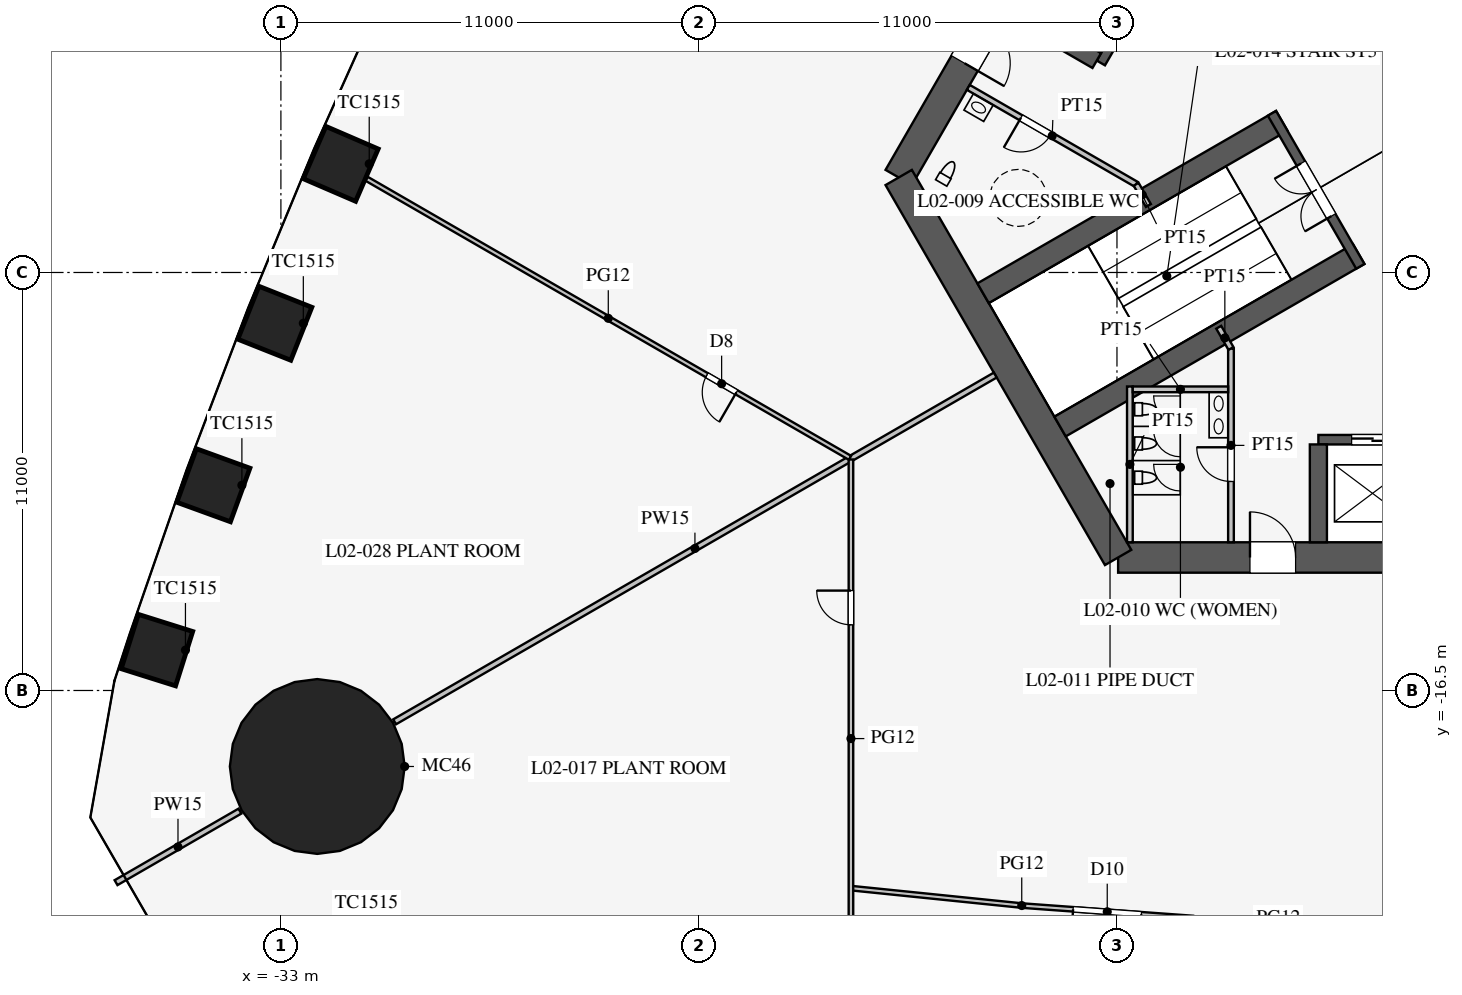
"""IFC4 building model, lengths in metres.
Left out: names, types, materials, properties, quantities, classifications, styles, units other than length and angle.
Written with IfcOpenShell. Run it as: python <this file> out.ifc"""

import sys

from ifc_helpers import new_model, si_unit, direction, frame, frame_2d, origin, origin_2d, place, context, subcontext, project, spatial, rectangle, circle, extrude, element, fill, save


model = new_model("IFC4")
c1 = context("Model", 3, precision=1e-05, world=origin(), true_north=direction((0.0, 1.0)))
c2 = subcontext(c1, "Body", "Model", "MODEL_VIEW")
j1 = project(units=[si_unit("LENGTHUNIT", "METRE"), si_unit("PLANEANGLEUNIT", "RADIAN")], contexts=[c1])
p1 = place(None, origin())
s1 = spatial("IfcSite", under=j1, at=p1, CompositionType="ELEMENT")
p2 = place(p1, origin())
s2 = spatial("IfcBuilding", under=s1, at=p2, CompositionType="ELEMENT")
p3 = place(p2, frame((0.0, 0.0, 11.5)))
s3 = spatial("IfcBuildingStorey", under=s2, at=p3, CompositionType="ELEMENT", Elevation=11.5)
for number, where, z_axis, x_axis in (
    (1, (-31.426, -2.641, 0.0), (0.0, 0.0, 1.0), (-0.396, -0.918, 0.0)),
    (2, (-33.16, -6.836, 0.0), (0.0, 0.0, 1.0), (-0.369, -0.929, 0.0)),
    (3, (-34.776, -11.099, 0.0), (0.0, 0.0, 1.0), (-0.342, -0.94, 0.0)),
    (4, (-36.262, -15.438, 0.0), (0.0, 0.0, 1.0), (-0.3, -0.954, 0.0)),
):
    element("IfcColumn", number, at=place(p3, frame(where, z_axis=z_axis, x_axis=x_axis)), inside=s3, PredefinedType="COLUMN", context=c2, shape_type="SweptSolid", body=[
        extrude(rectangle(XDim=1.5, YDim=1.5, at=origin_2d()), origin(), (0.0, 0.0, 1.0), 5.0),
    ])
p4 = place(p3, frame((-32.043, -18.5, 0.0), z_axis=(0.0, 0.0, 1.0), x_axis=(1.0, 0.0, 0.0)))
e5 = element("IfcColumn", 5, at=p4, inside=s3, PredefinedType="COLUMN", context=c2, shape_type="SweptSolid", body=[
    extrude(circle(Radius=2.3, at=origin_2d()), origin(), (0.0, 0.0, 1.0), 5.0),
])
p5 = place(p3, frame((-10.97, -13.0, 0.0), z_axis=(0.0, 0.0, 1.0), x_axis=(1.0, 0.0, 0.0)))
e6 = element("IfcWall", 6, at=p5, inside=s3, PredefinedType="SHEAR", context=c2, shape_type="SweptSolid", body=[
    extrude(rectangle(XDim=21.939, YDim=0.8, at=frame_2d((10.97, 0.0))), origin(), (0.0, 0.0, 1.0), 5.0),
])
p6 = place(p5, frame((17.27, 0.0, 0.0)))
e7 = element("IfcOpeningElement", 7, at=p6, cuts=e6, PredefinedType="OPENING", context=c2, shape_type="SweptSolid", body=[
    extrude(rectangle(XDim=1.2, YDim=2.1, at=frame_2d((0.6, 1.05))), frame((0.0, 0.41, 0.0), z_axis=(0.0, -1.0, 0.0), x_axis=(1.0, 0.0, 0.0)), (0.0, 0.0, 1.0), 0.82),
])
p7 = place(p5, frame((3.47, 0.0, 0.0)))
e8 = element("IfcOpeningElement", 8, at=p7, cuts=e6, PredefinedType="OPENING", context=c2, shape_type="SweptSolid", body=[
    extrude(rectangle(XDim=1.2, YDim=2.1, at=frame_2d((0.6, 1.05))), frame((0.0, 0.41, 0.0), z_axis=(0.0, -1.0, 0.0), x_axis=(1.0, 0.0, 0.0)), (0.0, 0.0, 1.0), 0.82),
])
p8 = place(p3, frame((-5.773, 16.0, 0.0), z_axis=(0.0, 0.0, 1.0), x_axis=(-0.500002442456, -0.866023993627, 0.0)))
e9 = element("IfcWall", 9, at=p8, inside=s3, PredefinedType="SHEAR", context=c2, shape_type="SweptSolid", body=[
    extrude(rectangle(XDim=21.939, YDim=0.8, at=frame_2d((10.97, 0.0))), origin(), (0.0, 0.0, 1.0), 5.0),
])
p9 = place(p8, frame((17.27, 0.0, 0.0)))
e10 = element("IfcOpeningElement", 10, at=p9, cuts=e9, PredefinedType="OPENING", context=c2, shape_type="SweptSolid", body=[
    extrude(rectangle(XDim=1.2, YDim=2.1, at=frame_2d((0.6, 1.05))), frame((0.0, 0.41, 0.0), z_axis=(0.0, -1.0, 0.0), x_axis=(1.0, 0.0, 0.0)), (0.0, 0.0, 1.0), 0.82),
])
p10 = place(p8, frame((3.47, 0.0, 0.0)))
e11 = element("IfcOpeningElement", 11, at=p10, cuts=e9, PredefinedType="OPENING", context=c2, shape_type="SweptSolid", body=[
    extrude(rectangle(XDim=1.2, YDim=2.1, at=frame_2d((0.6, 1.05))), frame((0.0, 0.41, 0.0), z_axis=(0.0, -1.0, 0.0), x_axis=(1.0, 0.0, 0.0)), (0.0, 0.0, 1.0), 0.82),
])
p11 = place(p3, frame((-16.743, -3.0, 0.0), z_axis=(0.0, 0.0, 1.0), x_axis=(0.499995765644, -0.866027848477, 0.0)))
e12 = element("IfcWall", 12, at=p11, inside=s3, PredefinedType="SHEAR", context=c2, shape_type="SweptSolid", body=[
    extrude(rectangle(XDim=11.547, YDim=0.8, at=frame_2d((5.773, 0.0))), origin(), (0.0, 0.0, 1.0), 5.0),
])
p12 = place(p3, frame((-5.7, -9.9, 0.0), z_axis=(0.0, 0.0, 1.0), x_axis=(1.0, 0.0, 0.0)))
e13 = element("IfcWall", 13, at=p12, inside=s3, PredefinedType="SHEAR", context=c2, shape_type="SweptSolid", body=[
    extrude(rectangle(XDim=11.4, YDim=0.25, at=frame_2d((5.7, 0.0))), origin(), (0.0, 0.0, 1.0), 5.0),
])
p13 = place(p12, frame((0.875, 0.0, 0.0)))
e14 = element("IfcOpeningElement", 14, at=p13, cuts=e13, PredefinedType="OPENING", context=c2, shape_type="SweptSolid", body=[
    extrude(rectangle(XDim=1.1, YDim=2.2, at=frame_2d((0.55, 1.1))), frame((0.0, 0.135, 0.0), z_axis=(0.0, -1.0, 0.0), x_axis=(1.0, 0.0, 0.0)), (0.0, 0.0, 1.0), 0.27),
])
p14 = place(p12, frame((3.725, 0.0, 0.0)))
e15 = element("IfcOpeningElement", 15, at=p14, cuts=e13, PredefinedType="OPENING", context=c2, shape_type="SweptSolid", body=[
    extrude(rectangle(XDim=1.1, YDim=2.2, at=frame_2d((0.55, 1.1))), frame((0.0, 0.135, 0.0), z_axis=(0.0, -1.0, 0.0), x_axis=(1.0, 0.0, 0.0)), (0.0, 0.0, 1.0), 0.27),
])
p15 = place(p12, frame((6.575, 0.0, 0.0)))
e16 = element("IfcOpeningElement", 16, at=p15, cuts=e13, PredefinedType="OPENING", context=c2, shape_type="SweptSolid", body=[
    extrude(rectangle(XDim=1.1, YDim=2.2, at=frame_2d((0.55, 1.1))), frame((0.0, 0.135, 0.0), z_axis=(0.0, -1.0, 0.0), x_axis=(1.0, 0.0, 0.0)), (0.0, 0.0, 1.0), 0.27),
])
p16 = place(p12, frame((9.425, 0.0, 0.0)))
e17 = element("IfcOpeningElement", 17, at=p16, cuts=e13, PredefinedType="OPENING", context=c2, shape_type="SweptSolid", body=[
    extrude(rectangle(XDim=1.1, YDim=2.2, at=frame_2d((0.55, 1.1))), frame((0.0, 0.135, 0.0), z_axis=(0.0, -1.0, 0.0), x_axis=(1.0, 0.0, 0.0)), (0.0, 0.0, 1.0), 0.27),
])
p17 = place(p3, frame((-5.7, -10.025, 0.0), z_axis=(0.0, 0.0, 1.0), x_axis=(0.0, -1.0, 0.0)))
e18 = element("IfcWall", 18, at=p17, inside=s3, PredefinedType="SHEAR", context=c2, shape_type="SweptSolid", body=[
    extrude(rectangle(XDim=2.575, YDim=0.45, at=frame_2d((1.288, 0.0))), origin(), (0.0, 0.0, 1.0), 5.0),
])
p18 = place(p3, frame((-5.724, 9.886, 0.0), z_axis=(0.0, 0.0, 1.0), x_axis=(-0.500001763848, -0.866024385424, 0.0)))
e19 = element("IfcWall", 19, at=p18, inside=s3, PredefinedType="SHEAR", context=c2, shape_type="SweptSolid", body=[
    extrude(rectangle(XDim=11.4, YDim=0.25, at=frame_2d((5.7, 0.0))), origin(), (0.0, 0.0, 1.0), 5.0),
])
p19 = place(p18, frame((6.525, 0.0, 0.0)))
e20 = element("IfcOpeningElement", 20, at=p19, cuts=e19, PredefinedType="OPENING", context=c2, shape_type="SweptSolid", body=[
    extrude(rectangle(XDim=1.2, YDim=2.2, at=frame_2d((0.6, 1.1))), frame((0.0, 0.135, 0.0), z_axis=(0.0, -1.0, 0.0), x_axis=(1.0, 0.0, 0.0)), (0.0, 0.0, 1.0), 0.27),
])
p20 = place(p18, frame((9.375, 0.0, 0.0)))
e21 = element("IfcOpeningElement", 21, at=p20, cuts=e19, PredefinedType="OPENING", context=c2, shape_type="SweptSolid", body=[
    extrude(rectangle(XDim=1.2, YDim=2.2, at=frame_2d((0.6, 1.1))), frame((0.0, 0.135, 0.0), z_axis=(0.0, -1.0, 0.0), x_axis=(1.0, 0.0, 0.0)), (0.0, 0.0, 1.0), 0.27),
])
p21 = place(p3, frame((-11.532, 0.076, 0.0), z_axis=(0.0, 0.0, 1.0), x_axis=(-0.866005588531, 0.500034319456, 0.0)))
e22 = element("IfcWall", 22, at=p21, inside=s3, PredefinedType="SHEAR", context=c2, shape_type="SweptSolid", body=[
    extrude(rectangle(XDim=2.575, YDim=0.45, at=frame_2d((1.288, 0.0))), origin(), (0.0, 0.0, 1.0), 5.0),
])
for number, where, z_axis, x_axis in (
    (23, (-6.663, -1.509, 0.0), (0.0, 0.0, 1.0), (-0.866, -0.5, 0.0)),
    (24, (-4.638, -5.016, 0.0), (0.0, 0.0, 1.0), (-0.866, -0.5, 0.0)),
):
    element("IfcWall", number, at=place(p3, frame(where, z_axis=z_axis, x_axis=x_axis)), inside=s3, PredefinedType="SHEAR", context=c2, shape_type="SweptSolid", body=[
        extrude(rectangle(XDim=9.075, YDim=0.6, at=frame_2d((4.538, 0.0))), origin(), (0.0, 0.0, 1.0), 5.0),
    ])
p22 = place(p3, frame((-6.922, -1.312, 0.0), z_axis=(0.0, 0.0, 1.0), x_axis=(0.499984536904, -0.866034331223, 0.0)))
e25 = element("IfcWall", 25, at=p22, inside=s3, PredefinedType="SHEAR", context=c2, shape_type="SweptSolid", body=[
    extrude(rectangle(XDim=4.65, YDim=0.25, at=frame_2d((2.325, 0.0))), origin(), (0.0, 0.0, 1.0), 5.0),
])
p23 = place(p22, frame((1.525, 0.0, 0.0)))
e26 = element("IfcOpeningElement", 26, at=p23, cuts=e25, PredefinedType="OPENING", context=c2, shape_type="SweptSolid", body=[
    extrude(rectangle(XDim=1.6, YDim=2.1, at=frame_2d((0.8, 1.05))), frame((0.0, 0.135, 0.0), z_axis=(0.0, -1.0, 0.0), x_axis=(1.0, 0.0, 0.0)), (0.0, 0.0, 1.0), 0.27),
])
p24 = place(p3, frame((-8.0, -7.5, 0.0), z_axis=(0.0, 0.0, 1.0), x_axis=(0.0, -1.0, 0.0)))
e27 = element("IfcWall", 27, at=p24, inside=s3, PredefinedType="PARTITIONING", context=c2, shape_type="SweptSolid", body=[
    extrude(rectangle(XDim=5.1, YDim=0.15, at=frame_2d((2.55, 0.0))), origin(), (0.0, 0.0, 1.0), 4.8),
])
p25 = place(p24, frame((2.6, 0.0, 0.0)))
e28 = element("IfcOpeningElement", 28, at=p25, cuts=e27, PredefinedType="OPENING", context=c2, shape_type="SweptSolid", body=[
    extrude(rectangle(XDim=0.9, YDim=2.1, at=frame_2d((0.45, 1.05))), frame((0.0, 0.085, 0.0), z_axis=(0.0, -1.0, 0.0), x_axis=(1.0, 0.0, 0.0)), (0.0, 0.0, 1.0), 0.17),
])
p26 = place(p3, frame((-10.495, -3.178, 0.0), z_axis=(0.0, 0.0, 1.0), x_axis=(-0.86602216432, 0.500005610874, 0.0)))
e29 = element("IfcWall", 29, at=p26, inside=s3, PredefinedType="PARTITIONING", context=c2, shape_type="SweptSolid", body=[
    extrude(rectangle(XDim=5.1, YDim=0.15, at=frame_2d((2.55, 0.0))), origin(), (0.0, 0.0, 1.0), 4.8),
])
p27 = place(p26, frame((2.6, 0.0, 0.0)))
e30 = element("IfcOpeningElement", 30, at=p27, cuts=e29, PredefinedType="OPENING", context=c2, shape_type="SweptSolid", body=[
    extrude(rectangle(XDim=0.9, YDim=2.1, at=frame_2d((0.45, 1.05))), frame((0.0, 0.085, 0.0), z_axis=(0.0, -1.0, 0.0), x_axis=(1.0, 0.0, 0.0)), (0.0, 0.0, 1.0), 0.17),
])
for number, where, z_axis, x_axis in (
    (31, (-10.495, -3.178, 0.0), (0.0, 0.0, 1.0), (0.5, -0.866, 0.0)),
    (32, (-8.0, -7.5, 0.0), (0.0, 0.0, 1.0), (-0.5, 0.866, 0.0)),
):
    element("IfcWall", number, at=place(p3, frame(where, z_axis=z_axis, x_axis=x_axis)), inside=s3, PredefinedType="PARTITIONING", context=c2, shape_type="SweptSolid", body=[
        extrude(rectangle(XDim=0.645, YDim=0.15, at=frame_2d((0.323, 0.0))), origin(), (0.0, 0.0, 1.0), 4.8),
    ])
p28 = place(p3, frame((-10.66, -8.5, 0.0), z_axis=(0.0, 0.0, 1.0), x_axis=(0.0, -1.0, 0.0)))
e33 = element("IfcWall", 33, at=p28, inside=s3, PredefinedType="PARTITIONING", context=c2, shape_type="SweptSolid", body=[
    extrude(rectangle(XDim=4.1, YDim=0.15, at=frame_2d((2.05, 0.0))), origin(), (0.0, 0.0, 1.0), 4.8),
])
p29 = place(p3, frame((-8.075, -8.575, 0.0), z_axis=(0.0, 0.0, 1.0), x_axis=(-1.0, 0.0, 0.0)))
e34 = element("IfcWall", 34, at=p29, inside=s3, PredefinedType="PARTITIONING", context=c2, shape_type="SweptSolid", body=[
    extrude(rectangle(XDim=2.51, YDim=0.15, at=frame_2d((1.255, 0.0))), origin(), (0.0, 0.0, 1.0), 4.8),
])
p30 = place(p3, frame((-14.203, -8.2, 0.0), z_axis=(0.0, 0.0, 1.0), x_axis=(-0.866024965723, -0.500000758745, 0.0)))
e35 = element("IfcWall", 35, at=p30, inside=s3, PredefinedType="PARTITIONING", context=c2, shape_type="SweptSolid", body=[
    extrude(rectangle(XDim=18.25, YDim=0.15, at=frame_2d((9.125, 0.0))), origin(), (0.0, 0.0, 1.0), 3.1),
])
p31 = place(p3, frame((-34.078, -19.675, 0.0), z_axis=(0.0, 0.0, 1.0), x_axis=(-0.866019247219, -0.500010663332, 0.0)))
e36 = element("IfcWall", 36, at=p31, inside=s3, PredefinedType="PARTITIONING", context=c2, shape_type="SweptSolid", body=[
    extrude(rectangle(XDim=3.764, YDim=0.15, at=frame_2d((1.882, 0.0))), origin(), (0.0, 0.0, 1.0), 3.1),
])
p32 = place(p3, frame((-13.5, -22.16, 0.0), z_axis=(0.0, 0.0, 1.0), x_axis=(0.997363894896, -0.072562119306, 0.0)))
e37 = element("IfcWall", 37, at=p32, inside=s3, PredefinedType="PARTITIONING", context=c2, shape_type="SweptSolid", body=[
    extrude(rectangle(XDim=4.512, YDim=0.12, at=frame_2d((2.256, 0.0))), origin(), (0.0, 0.0, 1.0), 3.6),
])
p33 = place(p32, frame((1.35, 0.0, 0.0)))
e38 = element("IfcOpeningElement", 38, at=p33, cuts=e37, PredefinedType="OPENING", context=c2, shape_type="SweptSolid", body=[
    extrude(rectangle(XDim=1.8, YDim=2.1, at=frame_2d((0.9, 1.05))), frame((0.0, 0.07, 0.0), z_axis=(0.0, -1.0, 0.0), x_axis=(1.0, 0.0, 0.0)), (0.0, 0.0, 1.0), 0.14),
])
p34 = place(p3, frame((-18.0, -21.701, 0.0), z_axis=(0.0, 0.0, 1.0), x_axis=(0.994833141332, -0.101523499286, 0.0)))
e39 = element("IfcWall", 39, at=p34, inside=s3, PredefinedType="PARTITIONING", context=c2, shape_type="SweptSolid", body=[
    extrude(rectangle(XDim=4.523, YDim=0.12, at=frame_2d((2.262, 0.0))), origin(), (0.0, 0.0, 1.0), 3.6),
])
p35 = place(p3, frame((-18.0, -10.421, 0.0), z_axis=(0.0, 0.0, 1.0), x_axis=(0.0, -1.0, 0.0)))
e40 = element("IfcWall", 40, at=p35, inside=s3, PredefinedType="PARTITIONING", context=c2, shape_type="SweptSolid", body=[
    extrude(rectangle(XDim=14.688, YDim=0.12, at=frame_2d((7.344, 0.0))), origin(), (0.0, 0.0, 1.0), 3.6),
])
p36 = place(p35, frame((3.45, 0.0, 0.0)))
e41 = element("IfcOpeningElement", 41, at=p36, cuts=e40, PredefinedType="OPENING", context=c2, shape_type="SweptSolid", body=[
    extrude(rectangle(XDim=0.9, YDim=2.1, at=frame_2d((0.45, 1.05))), frame((0.0, 0.07, 0.0), z_axis=(0.0, -1.0, 0.0), x_axis=(1.0, 0.0, 0.0)), (0.0, 0.0, 1.0), 0.14),
])
p37 = place(p3, frame((-18.025, -10.378, 0.0), z_axis=(0.0, 0.0, 1.0), x_axis=(-0.866027263711, 0.4999967785, 0.0)))
e42 = element("IfcWall", 42, at=p37, inside=s3, PredefinedType="PARTITIONING", context=c2, shape_type="SweptSolid", body=[
    extrude(rectangle(XDim=14.688, YDim=0.12, at=frame_2d((7.344, 0.0))), origin(), (0.0, 0.0, 1.0), 3.6),
])
p38 = place(p37, frame((3.45, 0.0, 0.0)))
e43 = element("IfcOpeningElement", 43, at=p38, cuts=e42, PredefinedType="OPENING", context=c2, shape_type="SweptSolid", body=[
    extrude(rectangle(XDim=0.9, YDim=2.1, at=frame_2d((0.45, 1.05))), frame((0.0, 0.07, 0.0), z_axis=(0.0, -1.0, 0.0), x_axis=(1.0, 0.0, 0.0)), (0.0, 0.0, 1.0), 0.14),
])
p39 = place(p25, frame((0.9, 0.0, 0.0), z_axis=(0.0, 0.0, 1.0), x_axis=(-1.0, 0.0, 0.0)))
e44 = element("IfcDoor", 44, at=p39, inside=s3, OperationType="SINGLE_SWING_RIGHT", PredefinedType="DOOR", context=c2, shape_type="SweptSolid", body=[
    extrude(rectangle(XDim=0.9, YDim=2.1, at=frame_2d((0.45, 1.05))), frame((0.0, 0.025, 0.0), z_axis=(0.0, -1.0, 0.0), x_axis=(1.0, 0.0, 0.0)), (0.0, 0.0, 1.0), 0.05),
])
fill(e28, e44)
p40 = place(p27, origin())
e45 = element("IfcDoor", 45, at=p40, inside=s3, OperationType="SINGLE_SWING_RIGHT", PredefinedType="DOOR", context=c2, shape_type="SweptSolid", body=[
    extrude(rectangle(XDim=0.9, YDim=2.1, at=frame_2d((0.45, 1.05))), frame((0.0, 0.025, 0.0), z_axis=(0.0, -1.0, 0.0), x_axis=(1.0, 0.0, 0.0)), (0.0, 0.0, 1.0), 0.05),
])
fill(e30, e45)
p41 = place(p23, frame((1.6, 0.0, 0.0), z_axis=(0.0, 0.0, 1.0), x_axis=(-1.0, 0.0, 0.0)))
e46 = element("IfcDoor", 46, at=p41, inside=s3, OperationType="DOUBLE_DOOR_SINGLE_SWING", PredefinedType="DOOR", context=c2, shape_type="SweptSolid", body=[
    extrude(rectangle(XDim=1.6, YDim=2.1, at=frame_2d((0.8, 1.05))), frame((0.0, 0.025, 0.0), z_axis=(0.0, -1.0, 0.0), x_axis=(1.0, 0.0, 0.0)), (0.0, 0.0, 1.0), 0.05),
])
fill(e26, e46)
p42 = place(p7, origin())
e47 = element("IfcDoor", 47, at=p42, inside=s3, OperationType="SINGLE_SWING_LEFT", PredefinedType="DOOR", context=c2, shape_type="SweptSolid", body=[
    extrude(rectangle(XDim=1.2, YDim=2.1, at=frame_2d((0.6, 1.05))), frame((0.0, 0.025, 0.0), z_axis=(0.0, -1.0, 0.0), x_axis=(1.0, 0.0, 0.0)), (0.0, 0.0, 1.0), 0.05),
])
fill(e8, e47)
p43 = place(p9, origin())
e48 = element("IfcDoor", 48, at=p43, inside=s3, OperationType="SINGLE_SWING_RIGHT", PredefinedType="DOOR", context=c2, shape_type="SweptSolid", body=[
    extrude(rectangle(XDim=1.2, YDim=2.1, at=frame_2d((0.6, 1.05))), frame((0.0, 0.025, 0.0), z_axis=(0.0, -1.0, 0.0), x_axis=(1.0, 0.0, 0.0)), (0.0, 0.0, 1.0), 0.05),
])
fill(e10, e48)
p44 = place(p36, frame((0.9, 0.0, 0.0), z_axis=(0.0, 0.0, 1.0), x_axis=(-1.0, 0.0, 0.0)))
e49 = element("IfcDoor", 49, at=p44, inside=s3, OperationType="SINGLE_SWING_RIGHT", PredefinedType="DOOR", context=c2, shape_type="SweptSolid", body=[
    extrude(rectangle(XDim=0.9, YDim=2.1, at=frame_2d((0.45, 1.05))), frame((0.0, 0.025, 0.0), z_axis=(0.0, -1.0, 0.0), x_axis=(1.0, 0.0, 0.0)), (0.0, 0.0, 1.0), 0.05),
])
fill(e41, e49)
p45 = place(p33, frame((1.8, 0.0, 0.0), z_axis=(0.0, 0.0, 1.0), x_axis=(-1.0, 0.0, 0.0)))
e50 = element("IfcDoor", 50, at=p45, inside=s3, OperationType="DOUBLE_DOOR_SINGLE_SWING", PredefinedType="DOOR", context=c2, shape_type="SweptSolid", body=[
    extrude(rectangle(XDim=1.8, YDim=2.1, at=frame_2d((0.9, 1.05))), frame((0.0, 0.025, 0.0), z_axis=(0.0, -1.0, 0.0), x_axis=(1.0, 0.0, 0.0)), (0.0, 0.0, 1.0), 0.05),
])
fill(e38, e50)
p46 = place(p38, origin())
e51 = element("IfcDoor", 51, at=p46, inside=s3, OperationType="SINGLE_SWING_LEFT", PredefinedType="DOOR", context=c2, shape_type="SweptSolid", body=[
    extrude(rectangle(XDim=0.9, YDim=2.1, at=frame_2d((0.45, 1.05))), frame((0.0, 0.025, 0.0), z_axis=(0.0, -1.0, 0.0), x_axis=(1.0, 0.0, 0.0)), (0.0, 0.0, 1.0), 0.05),
])
fill(e43, e51)
p47 = place(p13, origin())
e52 = element("IfcDoor", 52, at=p47, inside=s3, OperationType="DOUBLE_DOOR_SLIDING", PredefinedType="DOOR", context=c2, shape_type="SweptSolid", body=[
    extrude(rectangle(XDim=1.1, YDim=2.2, at=frame_2d((0.55, 1.1))), frame((0.0, 0.025, 0.0), z_axis=(0.0, -1.0, 0.0), x_axis=(1.0, 0.0, 0.0)), (0.0, 0.0, 1.0), 0.05),
])
fill(e14, e52)
save(model, sys.argv[1])
